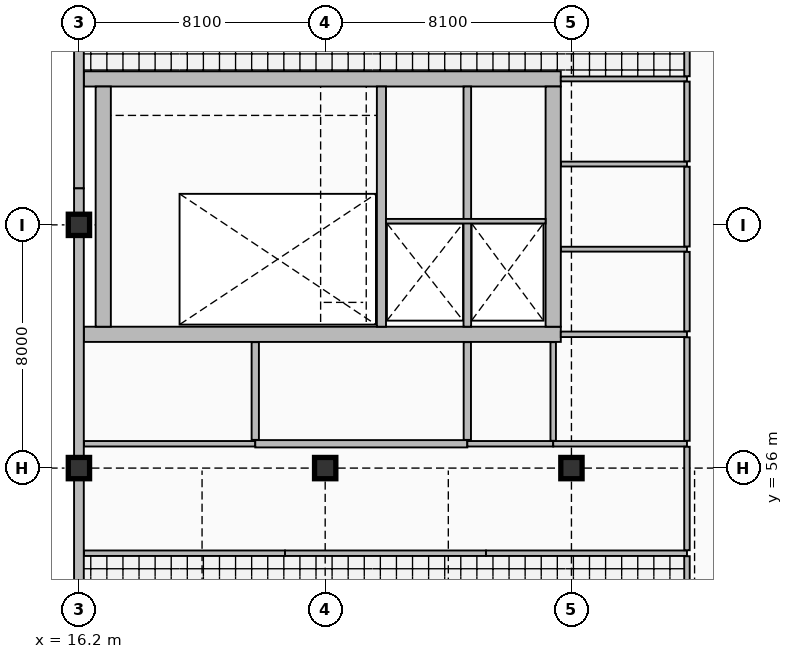
"""IFC4 building model, lengths in metres.
Left out: names, types, materials, properties, quantities, classifications, styles, units other than length and angle.
Written with IfcOpenShell. Run it as: python <this file> out.ifc"""

import sys

from ifc_helpers import new_model, si_unit, direction, frame, frame_2d, origin, origin_2d, place, context, subcontext, project, spatial, rectangle, extrude, element, fill, save


model = new_model("IFC4")
c1 = context("Model", 3, precision=1e-05, world=origin(), true_north=direction((0.0, 1.0)))
c2 = subcontext(c1, "Body", "Model", "MODEL_VIEW")
j1 = project(units=[si_unit("LENGTHUNIT", "METRE"), si_unit("PLANEANGLEUNIT", "RADIAN")], contexts=[c1])
p1 = place(None, origin())
s1 = spatial("IfcSite", under=j1, at=p1, CompositionType="ELEMENT")
p2 = place(p1, origin())
s2 = spatial("IfcBuilding", under=s1, at=p2, CompositionType="ELEMENT")
p3 = place(p2, frame((0.0, 0.0, 10.2)))
s3 = spatial("IfcBuildingStorey", under=s2, at=p3, CompositionType="ELEMENT", Elevation=10.2)
p4 = place(p3, frame((16.36, 60.4, 0.0), z_axis=(0.0, 0.0, 1.0), x_axis=(1.0, 0.0, 0.0)))
e1 = element("IfcWall", 1, at=p4, inside=s3, PredefinedType="SHEAR", context=c2, shape_type="SweptSolid", body=[
    extrude(rectangle(XDim=15.69, YDim=0.5, at=frame_2d((7.845, 0.0))), origin(), (0.0, 0.0, 1.0), 4.5),
])
p5 = place(p4, frame((1.39, 0.0, 0.0)))
e2 = element("IfcOpeningElement", 2, at=p5, cuts=e1, PredefinedType="OPENING", context=c2, shape_type="SweptSolid", body=[
    extrude(rectangle(XDim=1.15, YDim=2.25, at=frame_2d((0.575, 1.125))), frame((0.0, 0.26, 0.0), z_axis=(0.0, -1.0, 0.0), x_axis=(1.0, 0.0, 0.0)), (0.0, 0.0, 1.0), 0.52),
])
p6 = place(p4, frame((10.673, 0.0, 0.0)))
e3 = element("IfcOpeningElement", 3, at=p6, cuts=e1, PredefinedType="OPENING", context=c2, shape_type="SweptSolid", body=[
    extrude(rectangle(XDim=1.1, YDim=2.2, at=frame_2d((0.55, 1.1))), frame((0.0, 0.26, 0.0), z_axis=(0.0, -1.0, 0.0), x_axis=(1.0, 0.0, 0.0)), (0.0, 0.0, 1.0), 0.52),
])
p7 = place(p4, frame((13.387, 0.0, 0.0)))
e4 = element("IfcOpeningElement", 4, at=p7, cuts=e1, PredefinedType="OPENING", context=c2, shape_type="SweptSolid", body=[
    extrude(rectangle(XDim=1.1, YDim=2.2, at=frame_2d((0.55, 1.1))), frame((0.0, 0.26, 0.0), z_axis=(0.0, -1.0, 0.0), x_axis=(1.0, 0.0, 0.0)), (0.0, 0.0, 1.0), 0.52),
])
p8 = place(p3, frame((16.36, 68.8, 0.0), z_axis=(0.0, 0.0, 1.0), x_axis=(1.0, 0.0, 0.0)))
e5 = element("IfcWall", 5, at=p8, inside=s3, PredefinedType="SHEAR", context=c2, shape_type="SweptSolid", body=[
    extrude(rectangle(XDim=15.69, YDim=0.5, at=frame_2d((7.845, 0.0))), origin(), (0.0, 0.0, 1.0), 4.5),
])
for number, where, z_axis, x_axis in (
    (6, (17.0, 60.65, 0.0), (0.0, 0.0, 1.0), (0.0, 1.0, 0.0)),
    (7, (31.8, 60.65, 0.0), (0.0, 0.0, 1.0), (0.0, 1.0, 0.0)),
):
    element("IfcWall", number, at=place(p3, frame(where, z_axis=z_axis, x_axis=x_axis)), inside=s3, PredefinedType="SHEAR", context=c2, shape_type="SweptSolid", body=[
        extrude(rectangle(XDim=7.9, YDim=0.5, at=frame_2d((3.95, 0.0))), origin(), (0.0, 0.0, 1.0), 4.5),
    ])
p9 = place(p3, frame((26.15, 60.65, 0.0), z_axis=(0.0, 0.0, 1.0), x_axis=(0.0, 1.0, 0.0)))
e8 = element("IfcWall", 8, at=p9, inside=s3, PredefinedType="SHEAR", context=c2, shape_type="SweptSolid", body=[
    extrude(rectangle(XDim=7.9, YDim=0.3, at=frame_2d((3.95, 0.0))), origin(), (0.0, 0.0, 1.0), 4.5),
])
p10 = place(p3, frame((28.975, 60.65, 0.0), z_axis=(0.0, 0.0, 1.0), x_axis=(0.0, 1.0, 0.0)))
e9 = element("IfcWall", 9, at=p10, inside=s3, PredefinedType="SHEAR", context=c2, shape_type="SweptSolid", body=[
    extrude(rectangle(XDim=7.9, YDim=0.25, at=frame_2d((3.95, 0.0))), origin(), (0.0, 0.0, 1.0), 4.5),
])
for number, where, z_axis, x_axis in (
    (10, (16.2, 56.0, 0.0), (0.0, 0.0, 1.0), (1.0, 0.0, 0.0)),
    (11, (16.2, 64.0, 0.0), (0.0, 0.0, 1.0), (1.0, 0.0, 0.0)),
    (12, (24.3, 56.0, 0.0), (0.0, 0.0, 1.0), (1.0, 0.0, 0.0)),
    (13, (32.4, 56.0, 0.0), (0.0, 0.0, 1.0), (1.0, 0.0, 0.0)),
):
    element("IfcColumn", number, at=place(p3, frame(where, z_axis=z_axis, x_axis=x_axis)), inside=s3, PredefinedType="COLUMN", context=c2, shape_type="SweptSolid", body=[
        extrude(rectangle(XDim=0.7, YDim=0.7, at=origin_2d()), origin(), (0.0, 0.0, 1.0), 4.5),
    ])
p11 = place(p3, frame((16.2, 80.8, 0.0), z_axis=(0.0, 0.0, 1.0), x_axis=(0.0, -1.0, 0.0)))
e14 = element("IfcWall", 14, at=p11, inside=s3, PredefinedType="SOLIDWALL", context=c2, shape_type="SweptSolid", body=[
    extrude(rectangle(XDim=15.6, YDim=0.32, at=frame_2d((7.8, 0.0))), origin(), (0.0, 0.0, 1.0), 3.732),
])
p12 = place(p11, frame((4.5, 0.0, 0.95)))
e15 = element("IfcOpeningElement", 15, at=p12, cuts=e14, PredefinedType="OPENING", context=c2, shape_type="SweptSolid", body=[
    extrude(rectangle(XDim=1.8, YDim=1.8, at=frame_2d((0.9, 0.9))), frame((0.0, 0.17, 0.0), z_axis=(0.0, -1.0, 0.0), x_axis=(1.0, 0.0, 0.0)), (0.0, 0.0, 1.0), 0.34),
])
p13 = place(p3, frame((16.2, 65.2, 0.0), z_axis=(0.0, 0.0, 1.0), x_axis=(0.0, -1.0, 0.0)))
e16 = element("IfcWall", 16, at=p13, inside=s3, PredefinedType="SOLIDWALL", context=c2, shape_type="SweptSolid", body=[
    extrude(rectangle(XDim=15.6, YDim=0.32, at=frame_2d((7.8, 0.0))), origin(), (0.0, 0.0, 1.0), 3.732),
])
p14 = place(p3, frame((26.3, 64.12, 0.0), z_axis=(0.0, 0.0, 1.0), x_axis=(1.0, 0.0, 0.0)))
e17 = element("IfcWall", 17, at=p14, inside=s3, PredefinedType="PARTITIONING", context=c2, shape_type="SweptSolid", body=[
    extrude(rectangle(XDim=5.25, YDim=0.15, at=frame_2d((2.625, 0.0))), origin(), (0.0, 0.0, 1.0), 4.24),
])
p15 = place(p3, frame((16.368, 53.2, 0.0), z_axis=(0.0, 0.0, 1.0), x_axis=(1.0, 0.0, 0.0)))
e18 = element("IfcWall", 18, at=p15, inside=s3, PredefinedType="PARTITIONING", context=c2, shape_type="SweptSolid", body=[
    extrude(rectangle(XDim=6.611, YDim=0.18, at=frame_2d((3.305, 0.0))), origin(), (0.0, 0.0, 1.0), 4.24),
])
for number, where, z_axis, x_axis in (
    (19, (22.979, 53.2, 0.0), (0.0, 0.0, 1.0), (1.0, 0.0, 0.0)),
    (20, (29.589, 53.2, 0.0), (0.0, 0.0, 1.0), (1.0, 0.0, 0.0)),
):
    element("IfcWall", number, at=place(p3, frame(where, z_axis=z_axis, x_axis=x_axis)), inside=s3, PredefinedType="PARTITIONING", context=c2, shape_type="SweptSolid", body=[
        extrude(rectangle(XDim=6.611, YDim=0.18, at=frame_2d((3.305, 0.0))), origin(), (0.0, 0.0, 1.0), 4.24),
    ])
p16 = place(p3, frame((16.368, 56.8, 0.0), z_axis=(0.0, 0.0, 1.0), x_axis=(1.0, 0.0, 0.0)))
e21 = element("IfcWall", 21, at=p16, inside=s3, PredefinedType="PARTITIONING", context=c2, shape_type="SweptSolid", body=[
    extrude(rectangle(XDim=5.632, YDim=0.18, at=frame_2d((2.816, 0.0))), origin(), (0.0, 0.0, 1.0), 4.24),
])
p17 = place(p16, frame((2.266, 0.0, 0.0)))
e22 = element("IfcOpeningElement", 22, at=p17, cuts=e21, PredefinedType="OPENING", context=c2, shape_type="SweptSolid", body=[
    extrude(rectangle(XDim=1.1, YDim=2.2, at=frame_2d((0.55, 1.1))), frame((0.0, 0.1, 0.0), z_axis=(0.0, -1.0, 0.0), x_axis=(1.0, 0.0, 0.0)), (0.0, 0.0, 1.0), 0.2),
])
p18 = place(p3, frame((22.0, 56.8, 0.0), z_axis=(0.0, 0.0, 1.0), x_axis=(1.0, 0.0, 0.0)))
e23 = element("IfcWall", 23, at=p18, inside=s3, PredefinedType="PARTITIONING", context=c2, shape_type="SweptSolid", body=[
    extrude(rectangle(XDim=6.975, YDim=0.24, at=frame_2d((3.488, 0.0))), origin(), (0.0, 0.0, 1.0), 4.24),
])
p19 = place(p18, frame((4.003, 0.0, 0.0)))
e24 = element("IfcOpeningElement", 24, at=p19, cuts=e23, PredefinedType="OPENING", context=c2, shape_type="SweptSolid", body=[
    extrude(rectangle(XDim=1.2, YDim=2.3, at=frame_2d((0.6, 1.15))), frame((0.0, 0.13, 0.0), z_axis=(0.0, -1.0, 0.0), x_axis=(1.0, 0.0, 0.0)), (0.0, 0.0, 1.0), 0.26),
])
p20 = place(p3, frame((28.975, 56.8, 0.0), z_axis=(0.0, 0.0, 1.0), x_axis=(1.0, 0.0, 0.0)))
e25 = element("IfcWall", 25, at=p20, inside=s3, PredefinedType="PARTITIONING", context=c2, shape_type="SweptSolid", body=[
    extrude(rectangle(XDim=2.825, YDim=0.18, at=frame_2d((1.413, 0.0))), origin(), (0.0, 0.0, 1.0), 4.24),
])
p21 = place(p20, frame((0.636, 0.0, 0.0)))
e26 = element("IfcOpeningElement", 26, at=p21, cuts=e25, PredefinedType="OPENING", context=c2, shape_type="SweptSolid", body=[
    extrude(rectangle(XDim=1.1, YDim=2.2, at=frame_2d((0.55, 1.1))), frame((0.0, 0.1, 0.0), z_axis=(0.0, -1.0, 0.0), x_axis=(1.0, 0.0, 0.0)), (0.0, 0.0, 1.0), 0.2),
])
p22 = place(p3, frame((31.8, 56.8, 0.0), z_axis=(0.0, 0.0, 1.0), x_axis=(1.0, 0.0, 0.0)))
e27 = element("IfcWall", 27, at=p22, inside=s3, PredefinedType="PARTITIONING", context=c2, shape_type="SweptSolid", body=[
    extrude(rectangle(XDim=4.4, YDim=0.18, at=frame_2d((2.2, 0.0))), origin(), (0.0, 0.0, 1.0), 4.24),
])
p23 = place(p3, frame((32.05, 60.4, 0.0), z_axis=(0.0, 0.0, 1.0), x_axis=(1.0, 0.0, 0.0)))
e28 = element("IfcWall", 28, at=p23, inside=s3, PredefinedType="PARTITIONING", context=c2, shape_type="SweptSolid", body=[
    extrude(rectangle(XDim=4.15, YDim=0.18, at=frame_2d((2.075, 0.0))), origin(), (0.0, 0.0, 1.0), 4.24),
])
for number, where, z_axis, x_axis in (
    (29, (32.058, 63.2, 0.0), (0.0, 0.0, 1.0), (1.0, 0.0, 0.0)),
    (30, (32.058, 66.0, 0.0), (0.0, 0.0, 1.0), (1.0, 0.0, 0.0)),
):
    element("IfcWall", number, at=place(p3, frame(where, z_axis=z_axis, x_axis=x_axis)), inside=s3, PredefinedType="PARTITIONING", context=c2, shape_type="SweptSolid", body=[
        extrude(rectangle(XDim=4.142, YDim=0.16, at=frame_2d((2.071, 0.0))), origin(), (0.0, 0.0, 1.0), 4.24),
    ])
p24 = place(p3, frame((32.05, 68.8, 0.0), z_axis=(0.0, 0.0, 1.0), x_axis=(1.0, 0.0, 0.0)))
e31 = element("IfcWall", 31, at=p24, inside=s3, PredefinedType="PARTITIONING", context=c2, shape_type="SweptSolid", body=[
    extrude(rectangle(XDim=4.15, YDim=0.16, at=frame_2d((2.075, 0.0))), origin(), (0.0, 0.0, 1.0), 4.24),
])
p25 = place(p3, frame((22.0, 56.928, 0.0), z_axis=(0.0, 0.0, 1.0), x_axis=(0.0, 1.0, 0.0)))
e32 = element("IfcWall", 32, at=p25, inside=s3, PredefinedType="PARTITIONING", context=c2, shape_type="SweptSolid", body=[
    extrude(rectangle(XDim=3.214, YDim=0.24, at=frame_2d((1.607, 0.0))), origin(), (0.0, 0.0, 1.0), 4.24),
])
p26 = place(p25, frame((1.107, 0.0, 0.0)))
e33 = element("IfcOpeningElement", 33, at=p26, cuts=e32, PredefinedType="OPENING", context=c2, shape_type="SweptSolid", body=[
    extrude(rectangle(XDim=1.0, YDim=2.2, at=frame_2d((0.5, 1.1))), frame((0.0, 0.13, 0.0), z_axis=(0.0, -1.0, 0.0), x_axis=(1.0, 0.0, 0.0)), (0.0, 0.0, 1.0), 0.26),
])
p27 = place(p3, frame((28.975, 56.928, 0.0), z_axis=(0.0, 0.0, 1.0), x_axis=(0.0, 1.0, 0.0)))
e34 = element("IfcWall", 34, at=p27, inside=s3, PredefinedType="PARTITIONING", context=c2, shape_type="SweptSolid", body=[
    extrude(rectangle(XDim=3.214, YDim=0.24, at=frame_2d((1.607, 0.0))), origin(), (0.0, 0.0, 1.0), 4.24),
])
p28 = place(p3, frame((31.8, 56.898, 0.0), z_axis=(0.0, 0.0, 1.0), x_axis=(0.0, 1.0, 0.0)))
e35 = element("IfcWall", 35, at=p28, inside=s3, PredefinedType="PARTITIONING", context=c2, shape_type="SweptSolid", body=[
    extrude(rectangle(XDim=3.244, YDim=0.18, at=frame_2d((1.622, 0.0))), origin(), (0.0, 0.0, 1.0), 4.24),
])
p29 = place(p3, frame((36.2, 34.098, 0.0), z_axis=(0.0, 0.0, 1.0), x_axis=(0.0, 1.0, 0.0)))
e36 = element("IfcWall", 36, at=p29, inside=s3, PredefinedType="PARTITIONING", context=c2, shape_type="SweptSolid", body=[
    extrude(rectangle(XDim=19.004, YDim=0.18, at=frame_2d((9.502, 0.0))), origin(), (0.0, 0.0, 1.0), 3.825),
])
p30 = place(p29, frame((8.952, 0.0, 0.0)))
e37 = element("IfcOpeningElement", 37, at=p30, cuts=e36, PredefinedType="OPENING", context=c2, shape_type="SweptSolid", body=[
    extrude(rectangle(XDim=1.1, YDim=2.2, at=frame_2d((0.55, 1.1))), frame((0.0, 0.1, 0.0), z_axis=(0.0, -1.0, 0.0), x_axis=(1.0, 0.0, 0.0)), (0.0, 0.0, 1.0), 0.2),
])
p31 = place(p3, frame((36.2, 53.298, 0.0), z_axis=(0.0, 0.0, 1.0), x_axis=(0.0, 1.0, 0.0)))
e38 = element("IfcWall", 38, at=p31, inside=s3, PredefinedType="PARTITIONING", context=c2, shape_type="SweptSolid", body=[
    extrude(rectangle(XDim=3.404, YDim=0.18, at=frame_2d((1.702, 0.0))), origin(), (0.0, 0.0, 1.0), 3.825),
])
p32 = place(p31, frame((1.152, 0.0, 0.0)))
e39 = element("IfcOpeningElement", 39, at=p32, cuts=e38, PredefinedType="OPENING", context=c2, shape_type="SweptSolid", body=[
    extrude(rectangle(XDim=1.1, YDim=2.2, at=frame_2d((0.55, 1.1))), frame((0.0, 0.1, 0.0), z_axis=(0.0, -1.0, 0.0), x_axis=(1.0, 0.0, 0.0)), (0.0, 0.0, 1.0), 0.2),
])
p33 = place(p3, frame((36.2, 56.898, 0.0), z_axis=(0.0, 0.0, 1.0), x_axis=(0.0, 1.0, 0.0)))
e40 = element("IfcWall", 40, at=p33, inside=s3, PredefinedType="PARTITIONING", context=c2, shape_type="SweptSolid", body=[
    extrude(rectangle(XDim=3.404, YDim=0.18, at=frame_2d((1.702, 0.0))), origin(), (0.0, 0.0, 1.0), 4.24),
])
p34 = place(p33, frame((1.202, 0.0, 0.0)))
e41 = element("IfcOpeningElement", 41, at=p34, cuts=e40, PredefinedType="OPENING", context=c2, shape_type="SweptSolid", body=[
    extrude(rectangle(XDim=1.0, YDim=2.15, at=frame_2d((0.5, 1.075))), frame((0.0, 0.1, 0.0), z_axis=(0.0, -1.0, 0.0), x_axis=(1.0, 0.0, 0.0)), (0.0, 0.0, 1.0), 0.2),
])
p35 = place(p3, frame((36.2, 60.498, 0.0), z_axis=(0.0, 0.0, 1.0), x_axis=(0.0, 1.0, 0.0)))
e42 = element("IfcWall", 42, at=p35, inside=s3, PredefinedType="PARTITIONING", context=c2, shape_type="SweptSolid", body=[
    extrude(rectangle(XDim=2.614, YDim=0.18, at=frame_2d((1.307, 0.0))), origin(), (0.0, 0.0, 1.0), 4.24),
])
p36 = place(p35, frame((0.832, 0.0, 0.0)))
e43 = element("IfcOpeningElement", 43, at=p36, cuts=e42, PredefinedType="OPENING", context=c2, shape_type="SweptSolid", body=[
    extrude(rectangle(XDim=0.95, YDim=2.1, at=frame_2d((0.475, 1.05))), frame((0.0, 0.1, 0.0), z_axis=(0.0, -1.0, 0.0), x_axis=(1.0, 0.0, 0.0)), (0.0, 0.0, 1.0), 0.2),
])
p37 = place(p3, frame((36.2, 63.288, 0.0), z_axis=(0.0, 0.0, 1.0), x_axis=(0.0, 1.0, 0.0)))
e44 = element("IfcWall", 44, at=p37, inside=s3, PredefinedType="PARTITIONING", context=c2, shape_type="SweptSolid", body=[
    extrude(rectangle(XDim=2.624, YDim=0.18, at=frame_2d((1.312, 0.0))), origin(), (0.0, 0.0, 1.0), 4.24),
])
p38 = place(p37, frame((0.837, 0.0, 0.0)))
e45 = element("IfcOpeningElement", 45, at=p38, cuts=e44, PredefinedType="OPENING", context=c2, shape_type="SweptSolid", body=[
    extrude(rectangle(XDim=0.95, YDim=2.1, at=frame_2d((0.475, 1.05))), frame((0.0, 0.1, 0.0), z_axis=(0.0, -1.0, 0.0), x_axis=(1.0, 0.0, 0.0)), (0.0, 0.0, 1.0), 0.2),
])
p39 = place(p3, frame((36.2, 66.088, 0.0), z_axis=(0.0, 0.0, 1.0), x_axis=(0.0, 1.0, 0.0)))
e46 = element("IfcWall", 46, at=p39, inside=s3, PredefinedType="PARTITIONING", context=c2, shape_type="SweptSolid", body=[
    extrude(rectangle(XDim=2.624, YDim=0.18, at=frame_2d((1.312, 0.0))), origin(), (0.0, 0.0, 1.0), 4.24),
])
p40 = place(p39, frame((0.812, 0.0, 0.0)))
e47 = element("IfcOpeningElement", 47, at=p40, cuts=e46, PredefinedType="OPENING", context=c2, shape_type="SweptSolid", body=[
    extrude(rectangle(XDim=1.0, YDim=2.15, at=frame_2d((0.5, 1.075))), frame((0.0, 0.1, 0.0), z_axis=(0.0, -1.0, 0.0), x_axis=(1.0, 0.0, 0.0)), (0.0, 0.0, 1.0), 0.2),
])
p41 = place(p3, frame((36.2, 68.888, 0.0), z_axis=(0.0, 0.0, 1.0), x_axis=(0.0, 1.0, 0.0)))
e48 = element("IfcWall", 48, at=p41, inside=s3, PredefinedType="PARTITIONING", context=c2, shape_type="SweptSolid", body=[
    extrude(rectangle(XDim=14.044, YDim=0.18, at=frame_2d((7.022, 0.0))), origin(), (0.0, 0.0, 1.0), 3.825),
])
p42 = place(p41, frame((6.522, 0.0, 0.0)))
e49 = element("IfcOpeningElement", 49, at=p42, cuts=e48, PredefinedType="OPENING", context=c2, shape_type="SweptSolid", body=[
    extrude(rectangle(XDim=1.0, YDim=2.2, at=frame_2d((0.5, 1.1))), frame((0.0, 0.1, 0.0), z_axis=(0.0, -1.0, 0.0), x_axis=(1.0, 0.0, 0.0)), (0.0, 0.0, 1.0), 0.2),
])
p43 = place(p5, origin())
e50 = element("IfcDoor", 50, at=p43, inside=s3, OperationType="SINGLE_SWING_RIGHT", PredefinedType="DOOR", context=c2, shape_type="SweptSolid", body=[
    extrude(rectangle(XDim=1.15, YDim=2.25, at=frame_2d((0.575, 1.125))), frame((0.0, 0.025, 0.0), z_axis=(0.0, -1.0, 0.0), x_axis=(1.0, 0.0, 0.0)), (0.0, 0.0, 1.0), 0.05),
])
fill(e2, e50)
p44 = place(p6, frame((1.1, 0.0, 0.0), z_axis=(0.0, 0.0, 1.0), x_axis=(-1.0, 0.0, 0.0)))
e51 = element("IfcDoor", 51, at=p44, inside=s3, OperationType="DOUBLE_DOOR_SLIDING", PredefinedType="DOOR", context=c2, shape_type="SweptSolid", body=[
    extrude(rectangle(XDim=1.1, YDim=2.2, at=frame_2d((0.55, 1.1))), frame((0.0, 0.025, 0.0), z_axis=(0.0, -1.0, 0.0), x_axis=(1.0, 0.0, 0.0)), (0.0, 0.0, 1.0), 0.05),
])
fill(e3, e51)
p45 = place(p7, frame((1.1, 0.0, 0.0), z_axis=(0.0, 0.0, 1.0), x_axis=(-1.0, 0.0, 0.0)))
e52 = element("IfcDoor", 52, at=p45, inside=s3, OperationType="DOUBLE_DOOR_SLIDING", PredefinedType="DOOR", context=c2, shape_type="SweptSolid", body=[
    extrude(rectangle(XDim=1.1, YDim=2.2, at=frame_2d((0.55, 1.1))), frame((0.0, 0.025, 0.0), z_axis=(0.0, -1.0, 0.0), x_axis=(1.0, 0.0, 0.0)), (0.0, 0.0, 1.0), 0.05),
])
fill(e4, e52)
p46 = place(p17, frame((1.1, 0.0, 0.0), z_axis=(0.0, 0.0, 1.0), x_axis=(-1.0, 0.0, 0.0)))
e53 = element("IfcDoor", 53, at=p46, inside=s3, OperationType="SINGLE_SWING_RIGHT", PredefinedType="DOOR", context=c2, shape_type="SweptSolid", body=[
    extrude(rectangle(XDim=1.1, YDim=2.2, at=frame_2d((0.55, 1.1))), frame((0.0, 0.025, 0.0), z_axis=(0.0, -1.0, 0.0), x_axis=(1.0, 0.0, 0.0)), (0.0, 0.0, 1.0), 0.05),
])
fill(e22, e53)
p47 = place(p19, frame((1.2, 0.0, 0.0), z_axis=(0.0, 0.0, 1.0), x_axis=(-1.0, 0.0, 0.0)))
e54 = element("IfcDoor", 54, at=p47, inside=s3, OperationType="SINGLE_SWING_LEFT", PredefinedType="DOOR", context=c2, shape_type="SweptSolid", body=[
    extrude(rectangle(XDim=1.2, YDim=2.3, at=frame_2d((0.6, 1.15))), frame((0.0, 0.025, 0.0), z_axis=(0.0, -1.0, 0.0), x_axis=(1.0, 0.0, 0.0)), (0.0, 0.0, 1.0), 0.05),
])
fill(e24, e54)
p48 = place(p21, frame((1.1, 0.0, 0.0), z_axis=(0.0, 0.0, 1.0), x_axis=(-1.0, 0.0, 0.0)))
e55 = element("IfcDoor", 55, at=p48, inside=s3, OperationType="SINGLE_SWING_LEFT", PredefinedType="DOOR", context=c2, shape_type="SweptSolid", body=[
    extrude(rectangle(XDim=1.1, YDim=2.2, at=frame_2d((0.55, 1.1))), frame((0.0, 0.025, 0.0), z_axis=(0.0, -1.0, 0.0), x_axis=(1.0, 0.0, 0.0)), (0.0, 0.0, 1.0), 0.05),
])
fill(e26, e55)
p49 = place(p26, origin())
e56 = element("IfcDoor", 56, at=p49, inside=s3, OperationType="SINGLE_SWING_RIGHT", PredefinedType="DOOR", context=c2, shape_type="SweptSolid", body=[
    extrude(rectangle(XDim=1.0, YDim=2.2, at=frame_2d((0.5, 1.1))), frame((0.0, 0.025, 0.0), z_axis=(0.0, -1.0, 0.0), x_axis=(1.0, 0.0, 0.0)), (0.0, 0.0, 1.0), 0.05),
])
fill(e33, e56)
p50 = place(p32, origin())
e57 = element("IfcDoor", 57, at=p50, inside=s3, OperationType="SINGLE_SWING_RIGHT", PredefinedType="DOOR", context=c2, shape_type="SweptSolid", body=[
    extrude(rectangle(XDim=1.1, YDim=2.2, at=frame_2d((0.55, 1.1))), frame((0.0, 0.025, 0.0), z_axis=(0.0, -1.0, 0.0), x_axis=(1.0, 0.0, 0.0)), (0.0, 0.0, 1.0), 0.05),
])
fill(e39, e57)
p51 = place(p34, origin())
e58 = element("IfcDoor", 58, at=p51, inside=s3, OperationType="SINGLE_SWING_LEFT", PredefinedType="DOOR", context=c2, shape_type="SweptSolid", body=[
    extrude(rectangle(XDim=1.0, YDim=2.15, at=frame_2d((0.5, 1.075))), frame((0.0, 0.025, 0.0), z_axis=(0.0, -1.0, 0.0), x_axis=(1.0, 0.0, 0.0)), (0.0, 0.0, 1.0), 0.05),
])
fill(e41, e58)
p52 = place(p36, origin())
e59 = element("IfcDoor", 59, at=p52, inside=s3, OperationType="SINGLE_SWING_RIGHT", PredefinedType="DOOR", context=c2, shape_type="SweptSolid", body=[
    extrude(rectangle(XDim=0.95, YDim=2.1, at=frame_2d((0.475, 1.05))), frame((0.0, 0.025, 0.0), z_axis=(0.0, -1.0, 0.0), x_axis=(1.0, 0.0, 0.0)), (0.0, 0.0, 1.0), 0.05),
])
fill(e43, e59)
p53 = place(p38, origin())
e60 = element("IfcDoor", 60, at=p53, inside=s3, OperationType="SINGLE_SWING_LEFT", PredefinedType="DOOR", context=c2, shape_type="SweptSolid", body=[
    extrude(rectangle(XDim=0.95, YDim=2.1, at=frame_2d((0.475, 1.05))), frame((0.0, 0.025, 0.0), z_axis=(0.0, -1.0, 0.0), x_axis=(1.0, 0.0, 0.0)), (0.0, 0.0, 1.0), 0.05),
])
fill(e45, e60)
p54 = place(p40, origin())
e61 = element("IfcDoor", 61, at=p54, inside=s3, OperationType="SINGLE_SWING_RIGHT", PredefinedType="DOOR", context=c2, shape_type="SweptSolid", body=[
    extrude(rectangle(XDim=1.0, YDim=2.15, at=frame_2d((0.5, 1.075))), frame((0.0, 0.025, 0.0), z_axis=(0.0, -1.0, 0.0), x_axis=(1.0, 0.0, 0.0)), (0.0, 0.0, 1.0), 0.05),
])
fill(e47, e61)
save(model, sys.argv[1])
